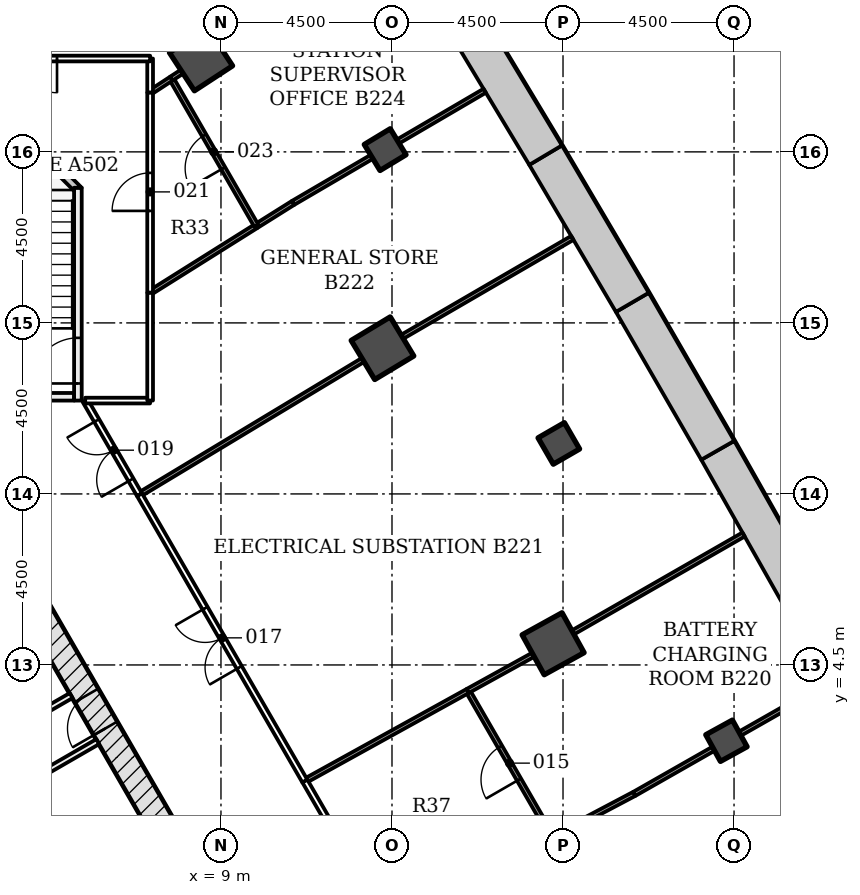
"""IFC4 building model, lengths in metres.
Left out: names, types, materials, properties, quantities, classifications, styles, units other than length and angle.
Written with IfcOpenShell. Run it as: python <this file> out.ifc"""

import sys

from ifc_helpers import new_model, si_unit, direction, frame, frame_2d, origin, origin_2d, place, context, subcontext, project, spatial, polyline, rectangle, outline, extrude, element, fill, save


model = new_model("IFC4")
c1 = context("Model", 3, precision=1e-05, world=origin(), true_north=direction((0.0, 1.0)))
c2 = subcontext(c1, "Body", "Model", "MODEL_VIEW")
j1 = project(units=[si_unit("LENGTHUNIT", "METRE"), si_unit("PLANEANGLEUNIT", "RADIAN")], contexts=[c1])
p1 = place(None, origin())
s1 = spatial("IfcSite", under=j1, at=p1, CompositionType="ELEMENT")
p2 = place(p1, origin())
s2 = spatial("IfcBuilding", under=s1, at=p2, CompositionType="ELEMENT")
p3 = place(p2, frame((0.0, 0.0, -9.0)))
s3 = spatial("IfcBuildingStorey", under=s2, at=p3, CompositionType="ELEMENT", Elevation=-9.0)
p4 = place(p3, origin())
e1 = element("IfcWall", 1, at=p4, inside=s3, PredefinedType="SOLIDWALL", context=c2, shape_type="SweptSolid", body=[
    extrude(outline(polyline([(24.721, 6.479), (22.506, 10.396), (21.638, 9.9), (23.848, 5.99), (24.721, 6.479)])), origin(), (0.0, 0.0, 1.0), 4.2),
])
p5 = place(p3, origin())
e2 = element("IfcWall", 2, at=p5, inside=s3, PredefinedType="SOLIDWALL", context=c2, shape_type="SweptSolid", body=[
    extrude(outline(polyline([(22.506, 10.396), (20.256, 14.293), (19.393, 13.789), (21.638, 9.9), (22.506, 10.396)])), origin(), (0.0, 0.0, 1.0), 4.2),
])
p6 = place(p3, origin())
e3 = element("IfcWall", 3, at=p6, inside=s3, PredefinedType="SOLIDWALL", context=c2, shape_type="SweptSolid", body=[
    extrude(outline(polyline([(20.256, 14.293), (17.971, 18.17), (17.112, 17.658), (19.393, 13.789), (20.256, 14.293)])), origin(), (0.0, 0.0, 1.0), 4.2),
])
p7 = place(p3, origin())
e4 = element("IfcWall", 4, at=p7, inside=s3, PredefinedType="SOLIDWALL", context=c2, shape_type="SweptSolid", body=[
    extrude(outline(polyline([(17.971, 18.17), (15.652, 22.026), (14.797, 21.506), (17.112, 17.658), (17.971, 18.17)])), origin(), (0.0, 0.0, 1.0), 4.2),
])
for number, where, z_axis, x_axis in (
    (5, (17.739, 5.058, -0.3), (0.0, 0.0, 1.0), (0.875, 0.484, 0.0)),
    (6, (13.25, 12.834, -0.3), (0.0, 0.0, 1.0), (0.857, 0.516, 0.0)),
    (7, (8.475, 20.438, -0.3), (0.0, 0.0, 1.0), (0.837, 0.547, 0.0)),
):
    element("IfcColumn", number, at=place(p3, frame(where, z_axis=z_axis, x_axis=x_axis)), inside=s3, PredefinedType="COLUMN", context=c2, shape_type="SweptSolid", body=[
        extrude(rectangle(XDim=1.2, YDim=1.2, at=origin_2d()), origin(), (0.0, 0.0, 1.0), 4.5),
    ])
for number, where, z_axis, x_axis in (
    (8, (22.3, 2.506, -0.3), (0.0, 0.0, 1.0), (0.876, 0.482, 0.0)),
    (9, (17.89, 10.329, -0.3), (0.0, 0.0, 1.0), (0.866, 0.5, 0.0)),
    (10, (13.32, 18.059, -0.3), (0.0, 0.0, 1.0), (0.856, 0.518, 0.0)),
):
    element("IfcColumn", number, at=place(p3, frame(where, z_axis=z_axis, x_axis=x_axis)), inside=s3, PredefinedType="COLUMN", context=c2, shape_type="SweptSolid", body=[
        extrude(rectangle(XDim=0.8, YDim=0.8, at=origin_2d()), origin(), (0.0, 0.0, 1.0), 4.5),
    ])
p8 = place(p3, frame((10.311, -4.703, -0.3), z_axis=(0.0, 0.0, 1.0), x_axis=(-0.500001446645, 0.866024568562, 0.0)))
e11 = element("IfcWall", 11, at=p8, inside=s3, PredefinedType="SHEAR", context=c2, shape_type="SweptSolid", body=[
    extrude(rectangle(XDim=18.458, YDim=0.7, at=frame_2d((9.229, 0.0))), origin(), (0.0, 0.0, 1.0), 4.5),
])
p9 = place(p8, frame((8.7, 0.0, 0.3)))
e12 = element("IfcOpeningElement", 12, at=p9, cuts=e11, PredefinedType="OPENING", context=c2, shape_type="SweptSolid", body=[
    extrude(rectangle(XDim=1.0, YDim=2.1, at=frame_2d((0.5, 1.05))), frame((0.0, 0.36, 0.0), z_axis=(0.0, -1.0, 0.0), x_axis=(1.0, 0.0, 0.0)), (0.0, 0.0, 1.0), 0.72),
])
p10 = place(p8, frame((4.002, 0.0, 0.3)))
e13 = element("IfcOpeningElement", 13, at=p10, cuts=e11, PredefinedType="OPENING", context=c2, shape_type="SweptSolid", body=[
    extrude(rectangle(XDim=0.9, YDim=2.1, at=frame_2d((0.45, 1.05))), frame((0.0, 0.36, 0.0), z_axis=(0.0, -1.0, 0.0), x_axis=(1.0, 0.0, 0.0)), (0.0, 0.0, 1.0), 0.72),
])
p11 = place(p8, frame((13.527, 0.0, 0.3)))
e14 = element("IfcOpeningElement", 14, at=p11, cuts=e11, PredefinedType="OPENING", context=c2, shape_type="SweptSolid", body=[
    extrude(rectangle(XDim=0.9, YDim=2.1, at=frame_2d((0.45, 1.05))), frame((0.0, 0.36, 0.0), z_axis=(0.0, -1.0, 0.0), x_axis=(1.0, 0.0, 0.0)), (0.0, 0.0, 1.0), 0.72),
])
p12 = place(p3, frame((-6.366, -4.517, 0.0), z_axis=(0.0, 0.0, 1.0), x_axis=(0.866023831006, 0.500002724122, 0.0)))
e15 = element("IfcWall", 15, at=p12, inside=s3, PredefinedType="PARTITIONING", context=c2, shape_type="SweptSolid", body=[
    extrude(rectangle(XDim=14.0, YDim=0.15, at=frame_2d((7.0, 0.0))), origin(), (0.0, 0.0, 1.0), 4.2),
])
p13 = place(p12, frame((4.951, 0.0, 0.0)))
e16 = element("IfcOpeningElement", 16, at=p13, cuts=e15, PredefinedType="OPENING", context=c2, shape_type="SweptSolid", body=[
    extrude(rectangle(XDim=0.9, YDim=2.1, at=frame_2d((0.45, 1.05))), frame((0.0, 0.085, 0.0), z_axis=(0.0, -1.0, 0.0), x_axis=(1.0, 0.0, 0.0)), (0.0, 0.0, 1.0), 0.17),
])
p14 = place(p3, frame((2.352, 2.133, 0.0), z_axis=(0.0, 0.0, 1.0), x_axis=(0.866042488821, 0.49997040668, 0.0)))
e17 = element("IfcWall", 17, at=p14, inside=s3, PredefinedType="PARTITIONING", context=c2, shape_type="SweptSolid", body=[
    extrude(rectangle(XDim=3.125, YDim=0.15, at=frame_2d((1.562, 0.0))), origin(), (0.0, 0.0, 1.0), 4.2),
])
p15 = place(p3, frame((7.07, -6.189, 0.0), z_axis=(0.0, 0.0, 1.0), x_axis=(-0.499997568964, 0.866026807339, 0.0)))
e18 = element("IfcWall", 18, at=p15, inside=s3, PredefinedType="PARTITIONING", context=c2, shape_type="SweptSolid", body=[
    extrude(rectangle(XDim=8.091, YDim=0.15, at=frame_2d((4.046, 0.0))), origin(), (0.0, 0.0, 1.0), 4.2),
])
p16 = place(p3, frame((5.135, 11.556, -0.3), z_axis=(0.0, 0.0, 1.0), x_axis=(-1.0, 0.0, 0.0)))
e19 = element("IfcWall", 19, at=p16, inside=s3, PredefinedType="SHEAR", context=c2, shape_type="SweptSolid", body=[
    extrude(rectangle(XDim=3.55, YDim=0.2, at=frame_2d((1.775, 0.0))), origin(), (0.0, 0.0, 1.0), 4.5),
])
p17 = place(p16, frame((1.175, 0.0, 0.3)))
e20 = element("IfcOpeningElement", 20, at=p17, cuts=e19, PredefinedType="OPENING", context=c2, shape_type="SweptSolid", body=[
    extrude(rectangle(XDim=1.2, YDim=2.1, at=frame_2d((0.6, 1.05))), frame((0.0, 0.11, 0.0), z_axis=(0.0, -1.0, 0.0), x_axis=(1.0, 0.0, 0.0)), (0.0, 0.0, 1.0), 0.22),
])
p18 = place(p3, frame((5.236, 11.456, -0.3), z_axis=(0.0, 0.0, 1.0), x_axis=(0.0, 1.0, 0.0)))
e21 = element("IfcWall", 21, at=p18, inside=s3, PredefinedType="SHEAR", context=c2, shape_type="SweptSolid", body=[
    extrude(rectangle(XDim=5.6, YDim=0.2, at=frame_2d((2.8, 0.0))), origin(), (0.0, 0.0, 1.0), 4.5),
])
p19 = place(p18, frame((0.45, 0.0, 0.3)))
e22 = element("IfcOpeningElement", 22, at=p19, cuts=e21, PredefinedType="OPENING", context=c2, shape_type="SweptSolid", body=[
    extrude(rectangle(XDim=1.2, YDim=2.1, at=frame_2d((0.6, 1.05))), frame((0.0, 0.11, 0.0), z_axis=(0.0, -1.0, 0.0), x_axis=(1.0, 0.0, 0.0)), (0.0, 0.0, 1.0), 0.22),
])
p20 = place(p3, frame((0.0, 0.0, -0.3)))
e23 = element("IfcWall", 23, at=p20, inside=s3, PredefinedType="SHEAR", context=c2, shape_type="SweptSolid", body=[
    extrude(outline(polyline([(5.336, 17.056), (3.736, 18.656), (1.586, 18.656), (1.586, 18.456), (3.653, 18.456), (5.135, 16.974), (5.135, 17.056), (5.135, 17.056), (5.135, 17.056), (5.135, 17.056), (5.135, 17.056), (5.135, 17.056), (5.135, 17.056), (5.135, 17.056), (5.135, 17.056), (5.135, 17.056), (5.135, 17.056), (5.135, 17.056), (5.135, 17.056), (5.135, 17.056), (5.135, 17.056), (5.135, 17.056), (5.135, 17.056), (5.336, 17.056)])), origin(), (0.0, 0.0, 1.0), 4.5),
])
p21 = place(p3, frame((21.959, 2.295, 0.0), z_axis=(0.0, 0.0, 1.0), x_axis=(-0.868831589773, -0.49510773435, 0.0)))
e24 = element("IfcWall", 24, at=p21, inside=s3, PredefinedType="PARTITIONING", context=c2, shape_type="SweptSolid", body=[
    extrude(rectangle(XDim=2.397, YDim=0.12, at=frame_2d((1.199, 0.0))), origin(), (0.0, 0.0, 1.0), 3.588),
])
p22 = place(p3, frame((19.875, 1.108, 0.0), z_axis=(0.0, 0.0, 1.0), x_axis=(-0.884133328187, -0.467234692621, 0.0)))
e25 = element("IfcWall", 25, at=p22, inside=s3, PredefinedType="PARTITIONING", context=c2, shape_type="SweptSolid", body=[
    extrude(rectangle(XDim=2.44, YDim=0.12, at=frame_2d((1.22, 0.0))), origin(), (0.0, 0.0, 1.0), 3.588),
])
p23 = place(p3, frame((24.951, 3.999, 0.0), z_axis=(0.0, 0.0, 1.0), x_axis=(-0.868958412069, -0.494885116057, 0.0)))
e26 = element("IfcWall", 26, at=p23, inside=s3, PredefinedType="PARTITIONING", context=c2, shape_type="SweptSolid", body=[
    extrude(rectangle(XDim=2.643, YDim=0.12, at=frame_2d((1.322, 0.0))), origin(), (0.0, 0.0, 1.0), 4.2),
])
p24 = place(p3, frame((11.205, 1.45, 0.0), z_axis=(0.0, 0.0, 1.0), x_axis=(0.500058412813, -0.865991676505, 0.0)))
e27 = element("IfcWall", 27, at=p24, inside=s3, PredefinedType="PARTITIONING", context=c2, shape_type="SweptSolid", body=[
    extrude(rectangle(XDim=4.361, YDim=0.15, at=frame_2d((2.181, 0.0))), origin(), (0.0, 0.0, 1.0), 3.588),
])
p25 = place(p24, frame((1.65, 0.0, 0.0)))
e28 = element("IfcOpeningElement", 28, at=p25, cuts=e27, PredefinedType="OPENING", context=c2, shape_type="SweptSolid", body=[
    extrude(rectangle(XDim=1.0, YDim=2.1, at=frame_2d((0.5, 1.05))), frame((0.0, 0.085, 0.0), z_axis=(0.0, -1.0, 0.0), x_axis=(1.0, 0.0, 0.0)), (0.0, 0.0, 1.0), 0.17),
])
p26 = place(p3, frame((17.717, -0.032, 0.0), z_axis=(0.0, 0.0, 1.0), x_axis=(-0.499892115999, 0.866087681682, 0.0)))
e29 = element("IfcWall", 29, at=p26, inside=s3, PredefinedType="PARTITIONING", context=c2, shape_type="SweptSolid", body=[
    extrude(rectangle(XDim=4.443, YDim=0.12, at=frame_2d((2.221, 0.0))), origin(), (0.0, 0.0, 1.0), 3.588),
])
p27 = place(p26, frame((1.75, 0.0, 0.0)))
e30 = element("IfcOpeningElement", 30, at=p27, cuts=e29, PredefinedType="OPENING", context=c2, shape_type="SweptSolid", body=[
    extrude(rectangle(XDim=1.0, YDim=2.1, at=frame_2d((0.5, 1.05))), frame((0.0, 0.07, 0.0), z_axis=(0.0, -1.0, 0.0), x_axis=(1.0, 0.0, 0.0)), (0.0, 0.0, 1.0), 0.14),
])
p28 = place(p3, frame((15.5, 3.819, 0.0), z_axis=(0.0, 0.0, 1.0), x_axis=(-0.875141691654, -0.483866737365, 0.0)))
e31 = element("IfcWall", 31, at=p28, inside=s3, PredefinedType="PARTITIONING", context=c2, shape_type="SweptSolid", body=[
    extrude(rectangle(XDim=4.904, YDim=0.12, at=frame_2d((2.452, 0.0))), origin(), (0.0, 0.0, 1.0), 3.588),
])
p29 = place(p3, frame((11.206, 1.446, 0.0), z_axis=(0.0, 0.0, 1.0), x_axis=(-0.499983976786, 0.866034654594, 0.0)))
e32 = element("IfcWall", 32, at=p29, inside=s3, PredefinedType="PARTITIONING", context=c2, shape_type="SweptSolid", body=[
    extrude(rectangle(XDim=8.7, YDim=0.15, at=frame_2d((4.35, 0.0))), origin(), (0.0, 0.0, 1.0), 3.588),
])
p30 = place(p29, frame((3.45, 0.0, 0.0)))
e33 = element("IfcOpeningElement", 33, at=p30, cuts=e32, PredefinedType="OPENING", context=c2, shape_type="SweptSolid", body=[
    extrude(rectangle(XDim=1.8, YDim=2.1, at=frame_2d((0.9, 1.05))), frame((0.0, 0.085, 0.0), z_axis=(0.0, -1.0, 0.0), x_axis=(1.0, 0.0, 0.0)), (0.0, 0.0, 1.0), 0.17),
])
p31 = place(p3, frame((6.855, 8.982, 0.0), z_axis=(0.0, 0.0, 1.0), x_axis=(-0.500176439337, 0.865923512519, 0.0)))
e34 = element("IfcWall", 34, at=p31, inside=s3, PredefinedType="PARTITIONING", context=c2, shape_type="SweptSolid", body=[
    extrude(rectangle(XDim=2.855, YDim=0.15, at=frame_2d((1.427, 0.0))), origin(), (0.0, 0.0, 1.0), 3.588),
])
p32 = place(p31, frame((0.45, 0.0, 0.0)))
e35 = element("IfcOpeningElement", 35, at=p32, cuts=e34, PredefinedType="OPENING", context=c2, shape_type="SweptSolid", body=[
    extrude(rectangle(XDim=1.8, YDim=2.1, at=frame_2d((0.9, 1.05))), frame((0.0, 0.085, 0.0), z_axis=(0.0, -1.0, 0.0), x_axis=(1.0, 0.0, 0.0)), (0.0, 0.0, 1.0), 0.17),
])
p33 = place(p3, frame((5.427, 11.456, 0.0), z_axis=(0.0, 0.0, 1.0), x_axis=(1.0, 0.0, 0.0)))
e36 = element("IfcWall", 36, at=p33, inside=s3, PredefinedType="PARTITIONING", context=c2, shape_type="SweptSolid", body=[
    extrude(rectangle(XDim=1.708, YDim=0.15, at=frame_2d((0.854, 0.0))), origin(), (0.0, 0.0, 1.0), 4.2),
])
p34 = place(p3, frame((7.136, 11.457, 0.0), z_axis=(0.0, 0.0, 1.0), x_axis=(0.0, 1.0, 0.0)))
e37 = element("IfcWall", 37, at=p34, inside=s3, PredefinedType="PARTITIONING", context=c2, shape_type="SweptSolid", body=[
    extrude(rectangle(XDim=2.839, YDim=0.15, at=frame_2d((1.419, 0.0))), origin(), (0.0, 0.0, 1.0), 3.588),
])
p35 = place(p3, frame((7.136, 14.297, 0.0), z_axis=(0.0, 0.0, 1.0), x_axis=(0.0, 1.0, 0.0)))
e38 = element("IfcWall", 38, at=p35, inside=s3, PredefinedType="PARTITIONING", context=c2, shape_type="SweptSolid", body=[
    extrude(rectangle(XDim=5.266, YDim=0.15, at=frame_2d((2.633, 0.0))), origin(), (0.0, 0.0, 1.0), 3.588),
])
p36 = place(p35, frame((2.15, 0.0, 0.0)))
e39 = element("IfcOpeningElement", 39, at=p36, cuts=e38, PredefinedType="OPENING", context=c2, shape_type="SweptSolid", body=[
    extrude(rectangle(XDim=1.0, YDim=2.1, at=frame_2d((0.5, 1.05))), frame((0.0, 0.085, 0.0), z_axis=(0.0, -1.0, 0.0), x_axis=(1.0, 0.0, 0.0)), (0.0, 0.0, 1.0), 0.17),
])
p37 = place(p3, frame((7.136, 19.563, 0.0), z_axis=(0.0, 0.0, 1.0), x_axis=(0.0, 1.0, 0.0)))
e40 = element("IfcWall", 40, at=p37, inside=s3, PredefinedType="PARTITIONING", context=c2, shape_type="SweptSolid", body=[
    extrude(rectangle(XDim=0.893, YDim=0.15, at=frame_2d((0.447, 0.0))), origin(), (0.0, 0.0, 1.0), 3.588),
])
p38 = place(p3, frame((7.136, 20.456, 0.0), z_axis=(0.0, 0.0, 1.0), x_axis=(-1.0, 0.0, 0.0)))
e41 = element("IfcWall", 41, at=p38, inside=s3, PredefinedType="PARTITIONING", context=c2, shape_type="SweptSolid", body=[
    extrude(rectangle(XDim=6.686, YDim=0.15, at=frame_2d((3.343, 0.0))), origin(), (0.0, 0.0, 1.0), 3.588),
])
p39 = place(p38, frame((2.45, 0.0, 0.0)))
e42 = element("IfcOpeningElement", 42, at=p39, cuts=e41, PredefinedType="OPENING", context=c2, shape_type="SweptSolid", body=[
    extrude(rectangle(XDim=1.8, YDim=2.1, at=frame_2d((0.9, 1.05))), frame((0.0, 0.085, 0.0), z_axis=(0.0, -1.0, 0.0), x_axis=(1.0, 0.0, 0.0)), (0.0, 0.0, 1.0), 0.17),
])
p40 = place(p3, frame((17.214, 4.767, 0.0), z_axis=(0.0, 0.0, 1.0), x_axis=(-0.875150297984, -0.48385117127, 0.0)))
e43 = element("IfcWall", 43, at=p40, inside=s3, PredefinedType="PARTITIONING", context=c2, shape_type="SweptSolid", body=[
    extrude(rectangle(XDim=1.968, YDim=0.12, at=frame_2d((0.984, 0.0))), origin(), (0.0, 0.0, 1.0), 3.588),
])
p41 = place(p3, frame((22.751, 7.932, 0.0), z_axis=(0.0, 0.0, 1.0), x_axis=(-0.867438170848, -0.497544992695, 0.0)))
e44 = element("IfcWall", 44, at=p41, inside=s3, PredefinedType="PARTITIONING", context=c2, shape_type="SweptSolid", body=[
    extrude(rectangle(XDim=5.177, YDim=0.12, at=frame_2d((2.589, 0.0))), origin(), (0.0, 0.0, 1.0), 3.583),
])
p42 = place(p3, frame((12.736, 12.524, 0.0), z_axis=(0.0, 0.0, 1.0), x_axis=(-0.856559377083, -0.516048479827, 0.0)))
e45 = element("IfcWall", 45, at=p42, inside=s3, PredefinedType="PARTITIONING", context=c2, shape_type="SweptSolid", body=[
    extrude(rectangle(XDim=6.864, YDim=0.12, at=frame_2d((3.432, 0.0))), origin(), (0.0, 0.0, 1.0), 3.588),
])
p43 = place(p3, frame((18.245, 15.736, 0.0), z_axis=(0.0, 0.0, 1.0), x_axis=(-0.864615819332, -0.502433562734, 0.0)))
e46 = element("IfcWall", 46, at=p43, inside=s3, PredefinedType="PARTITIONING", context=c2, shape_type="SweptSolid", body=[
    extrude(rectangle(XDim=5.177, YDim=0.12, at=frame_2d((2.588, 0.0))), origin(), (0.0, 0.0, 1.0), 3.583),
])
p44 = place(p3, frame((9.932, 16.051, 0.0), z_axis=(0.0, 0.0, 1.0), x_axis=(-0.846948891592, -0.531674312932, 0.0)))
e47 = element("IfcWall", 47, at=p44, inside=s3, PredefinedType="PARTITIONING", context=c2, shape_type="SweptSolid", body=[
    extrude(rectangle(XDim=3.299, YDim=0.12, at=frame_2d((1.649, 0.0))), origin(), (0.0, 0.0, 1.0), 3.588),
])
p45 = place(p3, frame((12.968, 17.869, 0.0), z_axis=(0.0, 0.0, 1.0), x_axis=(-0.863161652457, -0.504927679701, 0.0)))
e48 = element("IfcWall", 48, at=p45, inside=s3, PredefinedType="PARTITIONING", context=c2, shape_type="SweptSolid", body=[
    extrude(rectangle(XDim=2.398, YDim=0.12, at=frame_2d((1.199, 0.0))), origin(), (0.0, 0.0, 1.0), 3.588),
])
p46 = place(p3, frame((10.898, 16.658, 0.0), z_axis=(0.0, 0.0, 1.0), x_axis=(-0.846984344306, -0.531617833128, 0.0)))
e49 = element("IfcWall", 49, at=p46, inside=s3, PredefinedType="PARTITIONING", context=c2, shape_type="SweptSolid", body=[
    extrude(rectangle(XDim=1.138, YDim=0.12, at=frame_2d((0.569, 0.0))), origin(), (0.0, 0.0, 1.0), 3.588),
])
p47 = place(p3, frame((15.939, 19.608, 0.0), z_axis=(0.0, 0.0, 1.0), x_axis=(-0.863057686295, -0.505105365371, 0.0)))
e50 = element("IfcWall", 50, at=p47, inside=s3, PredefinedType="PARTITIONING", context=c2, shape_type="SweptSolid", body=[
    extrude(rectangle(XDim=2.643, YDim=0.12, at=frame_2d((1.321, 0.0))), origin(), (0.0, 0.0, 1.0), 4.2),
])
p48 = place(p3, frame((9.932, 16.053, 0.0), z_axis=(0.0, 0.0, 1.0), x_axis=(-0.499861052408, 0.866105610353, 0.0)))
e51 = element("IfcWall", 51, at=p48, inside=s3, PredefinedType="PARTITIONING", context=c2, shape_type="SweptSolid", body=[
    extrude(rectangle(XDim=4.473, YDim=0.12, at=frame_2d((2.236, 0.0))), origin(), (0.0, 0.0, 1.0), 3.588),
])
p49 = place(p48, frame((1.75, 0.0, 0.0)))
e52 = element("IfcOpeningElement", 52, at=p49, cuts=e51, PredefinedType="OPENING", context=c2, shape_type="SweptSolid", body=[
    extrude(rectangle(XDim=1.0, YDim=2.1, at=frame_2d((0.5, 1.05))), frame((0.0, 0.07, 0.0), z_axis=(0.0, -1.0, 0.0), x_axis=(1.0, 0.0, 0.0)), (0.0, 0.0, 1.0), 0.14),
])
p50 = place(p3, frame((7.698, 19.929, 0.0), z_axis=(0.0, 0.0, 1.0), x_axis=(-0.837123867648, -0.547013372975, 0.0)))
e53 = element("IfcWall", 53, at=p50, inside=s3, PredefinedType="PARTITIONING", context=c2, shape_type="SweptSolid", body=[
    extrude(rectangle(XDim=0.669, YDim=0.12, at=frame_2d((0.334, 0.0))), origin(), (0.0, 0.0, 1.0), 3.588),
])
p51 = place(p3, frame((7.973, 20.109, 0.0), z_axis=(0.0, 0.0, 1.0), x_axis=(-0.838160669165, -0.545423406781, 0.0)))
e54 = element("IfcWall", 54, at=p51, inside=s3, PredefinedType="PARTITIONING", context=c2, shape_type="SweptSolid", body=[
    extrude(rectangle(XDim=0.335, YDim=0.12, at=frame_2d((0.167, 0.0))), origin(), (0.0, 0.0, 1.0), 3.588),
])
p52 = place(p9, origin())
e55 = element("IfcDoor", 55, at=p52, inside=s3, OperationType="SINGLE_SWING_LEFT", PredefinedType="DOOR", context=c2, shape_type="SweptSolid", body=[
    extrude(rectangle(XDim=1.0, YDim=2.1, at=frame_2d((0.5, 1.05))), frame((0.0, 0.075, 0.0), z_axis=(0.0, -1.0, 0.0), x_axis=(1.0, 0.0, 0.0)), (0.0, 0.0, 1.0), 0.15),
])
fill(e12, e55)
p53 = place(p19, origin())
e56 = element("IfcDoor", 56, at=p53, inside=s3, OperationType="SINGLE_SWING_LEFT", PredefinedType="DOOR", context=c2, shape_type="SweptSolid", body=[
    extrude(rectangle(XDim=1.2, YDim=2.1, at=frame_2d((0.6, 1.05))), frame((0.0, 0.025, 0.0), z_axis=(0.0, -1.0, 0.0), x_axis=(1.0, 0.0, 0.0)), (0.0, 0.0, 1.0), 0.05),
])
fill(e22, e56)
p54 = place(p27, origin())
e57 = element("IfcDoor", 57, at=p54, inside=s3, OperationType="SINGLE_SWING_LEFT", PredefinedType="DOOR", context=c2, shape_type="SweptSolid", body=[
    extrude(rectangle(XDim=1.0, YDim=2.1, at=frame_2d((0.5, 1.05))), frame((0.0, 0.025, 0.0), z_axis=(0.0, -1.0, 0.0), x_axis=(1.0, 0.0, 0.0)), (0.0, 0.0, 1.0), 0.05),
])
fill(e30, e57)
p55 = place(p30, origin())
e58 = element("IfcDoor", 58, at=p55, inside=s3, OperationType="DOUBLE_DOOR_SINGLE_SWING", PredefinedType="DOOR", context=c2, shape_type="SweptSolid", body=[
    extrude(rectangle(XDim=1.8, YDim=2.1, at=frame_2d((0.9, 1.05))), frame((0.0, 0.025, 0.0), z_axis=(0.0, -1.0, 0.0), x_axis=(1.0, 0.0, 0.0)), (0.0, 0.0, 1.0), 0.05),
])
fill(e33, e58)
p56 = place(p32, origin())
e59 = element("IfcDoor", 59, at=p56, inside=s3, OperationType="DOUBLE_DOOR_SINGLE_SWING", PredefinedType="DOOR", context=c2, shape_type="SweptSolid", body=[
    extrude(rectangle(XDim=1.8, YDim=2.1, at=frame_2d((0.9, 1.05))), frame((0.0, 0.025, 0.0), z_axis=(0.0, -1.0, 0.0), x_axis=(1.0, 0.0, 0.0)), (0.0, 0.0, 1.0), 0.05),
])
fill(e35, e59)
p57 = place(p36, origin())
e60 = element("IfcDoor", 60, at=p57, inside=s3, OperationType="SINGLE_SWING_LEFT", PredefinedType="DOOR", context=c2, shape_type="SweptSolid", body=[
    extrude(rectangle(XDim=1.0, YDim=2.1, at=frame_2d((0.5, 1.05))), frame((0.0, 0.025, 0.0), z_axis=(0.0, -1.0, 0.0), x_axis=(1.0, 0.0, 0.0)), (0.0, 0.0, 1.0), 0.05),
])
fill(e39, e60)
p58 = place(p49, origin())
e61 = element("IfcDoor", 61, at=p58, inside=s3, OperationType="SINGLE_SWING_LEFT", PredefinedType="DOOR", context=c2, shape_type="SweptSolid", body=[
    extrude(rectangle(XDim=1.0, YDim=2.1, at=frame_2d((0.5, 1.05))), frame((0.0, 0.025, 0.0), z_axis=(0.0, -1.0, 0.0), x_axis=(1.0, 0.0, 0.0)), (0.0, 0.0, 1.0), 0.05),
])
fill(e52, e61)
p59 = place(p39, origin())
e62 = element("IfcDoor", 62, at=p59, inside=s3, OperationType="DOUBLE_DOOR_SINGLE_SWING", PredefinedType="DOOR", context=c2, shape_type="SweptSolid", body=[
    extrude(rectangle(XDim=1.8, YDim=2.1, at=frame_2d((0.9, 1.05))), frame((0.0, 0.025, 0.0), z_axis=(0.0, -1.0, 0.0), x_axis=(1.0, 0.0, 0.0)), (0.0, 0.0, 1.0), 0.05),
])
fill(e42, e62)
save(model, sys.argv[1])
